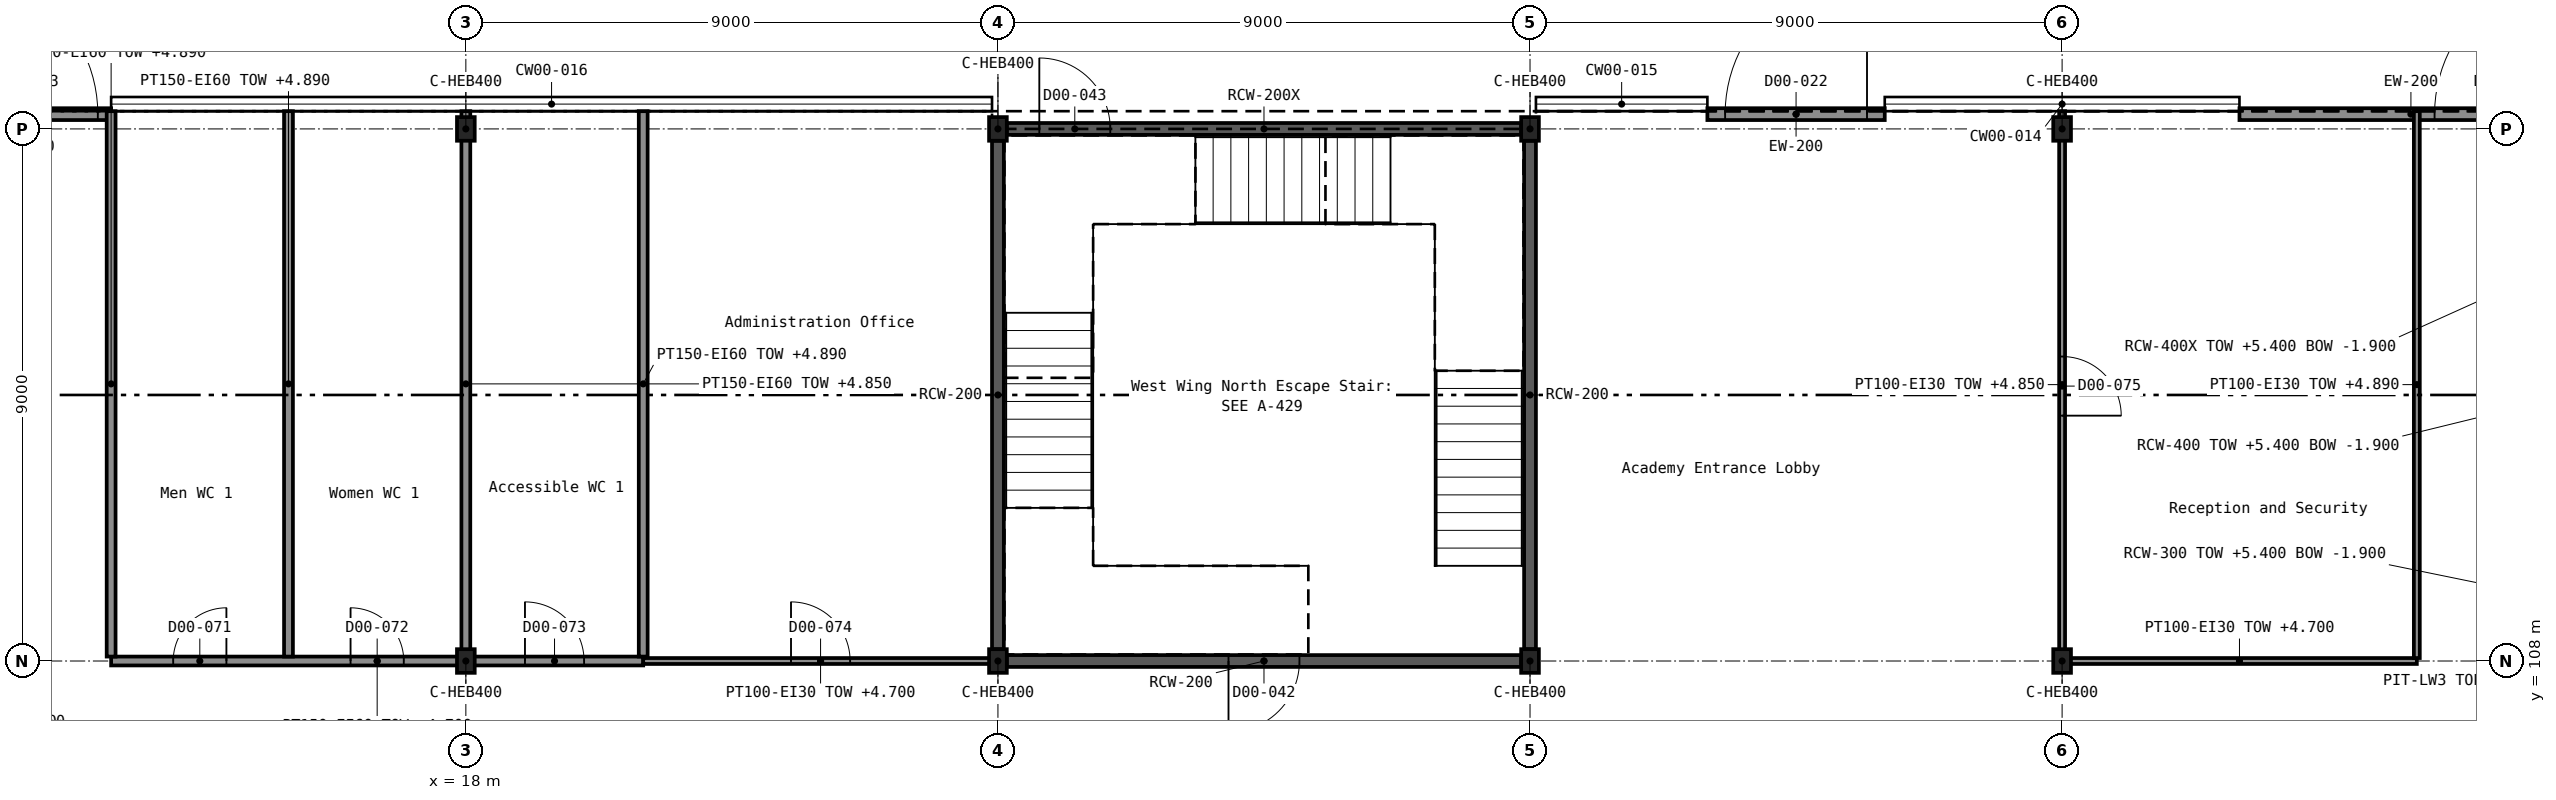
"""IFC4 building model, lengths in metres.
Left out: names, types, materials, properties, quantities, classifications, styles, units other than length and angle.
Written with IfcOpenShell. Run it as: python <this file> out.ifc"""

import sys

from ifc_helpers import new_model, si_unit, direction, frame, frame_2d, origin, origin_2d, place, context, subcontext, project, spatial, rectangle, i_section, extrude, element, fill, save


model = new_model("IFC4")
c1 = context("Model", 3, precision=1e-05, world=origin(), true_north=direction((0.0, 1.0)))
c2 = subcontext(c1, "Body", "Model", "MODEL_VIEW")
j1 = project(units=[si_unit("LENGTHUNIT", "METRE"), si_unit("PLANEANGLEUNIT", "RADIAN")], contexts=[c1])
p1 = place(None, origin())
s1 = spatial("IfcSite", under=j1, at=p1, CompositionType="ELEMENT")
p2 = place(p1, origin())
s2 = spatial("IfcBuilding", under=s1, at=p2, CompositionType="ELEMENT")
p3 = place(p2, origin())
s3 = spatial("IfcBuildingStorey", under=s2, at=p3, CompositionType="ELEMENT", Elevation=0.0)
for number, where, z_axis, x_axis in (
    (1, (18.0, 108.0, -0.3), (0.0, 0.0, 1.0), (1.0, 0.0, 0.0)),
    (2, (27.0, 108.0, -0.3), (0.0, 0.0, 1.0), (1.0, 0.0, 0.0)),
    (3, (36.0, 108.0, -0.3), (0.0, 0.0, 1.0), (1.0, 0.0, 0.0)),
    (4, (45.0, 108.0, -0.3), (0.0, 0.0, 1.0), (1.0, 0.0, 0.0)),
    (5, (18.0, 117.0, -0.3), (0.0, 0.0, 1.0), (1.0, 0.0, 0.0)),
    (6, (27.0, 117.0, -0.3), (0.0, 0.0, 1.0), (1.0, 0.0, 0.0)),
    (7, (36.0, 117.0, -0.3), (0.0, 0.0, 1.0), (1.0, 0.0, 0.0)),
    (8, (45.0, 117.0, -0.3), (0.0, 0.0, 1.0), (1.0, 0.0, 0.0)),
):
    element("IfcColumn", number, at=place(p3, frame(where, z_axis=z_axis, x_axis=x_axis)), inside=s3, PredefinedType="COLUMN", context=c2, shape_type="SweptSolid", body=[
        extrude(i_section(OverallWidth=0.3, OverallDepth=0.4, WebThickness=0.013, FlangeThickness=0.024, FilletRadius=0.027, at=origin_2d()), origin(), (0.0, 0.0, 1.0), 5.7),
    ])
p4 = place(p3, frame((53.8, 117.25, 0.0), z_axis=(0.0, 0.0, 1.0), x_axis=(-1.0, 0.0, 0.0)))
e9 = element("IfcWall", 9, at=p4, inside=s3, PredefinedType="SOLIDWALL", context=c2, shape_type="SweptSolid", body=[
    extrude(rectangle(XDim=5.8, YDim=0.2, at=frame_2d((2.9, 0.0))), origin(), (0.0, 0.0, 1.0), 5.4),
])
p5 = place(p4, frame((0.1, 0.0, 0.0)))
e10 = element("IfcOpeningElement", 10, at=p5, cuts=e9, PredefinedType="OPENING", context=c2, shape_type="SweptSolid", body=[
    extrude(rectangle(XDim=2.4, YDim=2.4, at=frame_2d((1.2, 1.2))), frame((0.0, 0.111, 0.0), z_axis=(0.0, -1.0, 0.0), x_axis=(1.0, 0.0, 0.0)), (0.0, 0.0, 1.0), 0.222),
])
p6 = place(p3, frame((42.0, 117.25, 0.0), z_axis=(0.0, 0.0, 1.0), x_axis=(-1.0, 0.0, 0.0)))
e11 = element("IfcWall", 11, at=p6, inside=s3, PredefinedType="SOLIDWALL", context=c2, shape_type="SweptSolid", body=[
    extrude(rectangle(XDim=3.0, YDim=0.2, at=frame_2d((1.5, 0.0))), origin(), (0.0, 0.0, 1.0), 5.4),
])
p7 = place(p6, frame((0.3, 0.0, 0.0)))
e12 = element("IfcOpeningElement", 12, at=p7, cuts=e11, PredefinedType="OPENING", context=c2, shape_type="SweptSolid", body=[
    extrude(rectangle(XDim=2.4, YDim=2.4, at=frame_2d((1.2, 1.2))), frame((0.0, 0.111, 0.0), z_axis=(0.0, -1.0, 0.0), x_axis=(1.0, 0.0, 0.0)), (0.0, 0.0, 1.0), 0.222),
])
p8 = place(p3, frame((12.0, 117.25, 0.0), z_axis=(0.0, 0.0, 1.0), x_axis=(-1.0, 0.0, 0.0)))
e13 = element("IfcWall", 13, at=p8, inside=s3, PredefinedType="SOLIDWALL", context=c2, shape_type="SweptSolid", body=[
    extrude(rectangle(XDim=2.85, YDim=0.2, at=frame_2d((1.425, 0.0))), origin(), (0.0, 0.0, 1.0), 5.4),
])
p9 = place(p8, frame((0.225, 0.0, 0.0)))
e14 = element("IfcOpeningElement", 14, at=p9, cuts=e13, PredefinedType="OPENING", context=c2, shape_type="SweptSolid", body=[
    extrude(rectangle(XDim=2.4, YDim=2.4, at=frame_2d((1.2, 1.2))), frame((0.0, 0.111, 0.0), z_axis=(0.0, -1.0, 0.0), x_axis=(1.0, 0.0, 0.0)), (0.0, 0.0, 1.0), 0.222),
])
p10 = place(p3, frame((27.15, 108.0, 0.0), z_axis=(0.0, 0.0, 1.0), x_axis=(1.0, 0.0, 0.0)))
e15 = element("IfcWall", 15, at=p10, inside=s3, PredefinedType="SHEAR", context=c2, shape_type="SweptSolid", body=[
    extrude(rectangle(XDim=8.7, YDim=0.2, at=frame_2d((4.35, 0.0))), origin(), (0.0, 0.0, 1.0), 5.4),
])
p11 = place(p10, frame((3.75, 0.0, 0.0)))
e16 = element("IfcOpeningElement", 16, at=p11, cuts=e15, PredefinedType="OPENING", context=c2, shape_type="SweptSolid", body=[
    extrude(rectangle(XDim=1.2, YDim=2.1, at=frame_2d((0.6, 1.05))), frame((0.0, 0.111, 0.0), z_axis=(0.0, -1.0, 0.0), x_axis=(1.0, 0.0, 0.0)), (0.0, 0.0, 1.0), 0.222),
])
p12 = place(p3, frame((27.15, 117.0, 0.0), z_axis=(0.0, 0.0, 1.0), x_axis=(1.0, 0.0, 0.0)))
e17 = element("IfcWall", 17, at=p12, inside=s3, PredefinedType="SHEAR", context=c2, shape_type="SweptSolid", body=[
    extrude(rectangle(XDim=8.7, YDim=0.2, at=frame_2d((4.35, 0.0))), origin(), (0.0, 0.0, 1.0), 5.4),
])
p13 = place(p12, frame((0.55, 0.0, 0.0)))
e18 = element("IfcOpeningElement", 18, at=p13, cuts=e17, PredefinedType="OPENING", context=c2, shape_type="SweptSolid", body=[
    extrude(rectangle(XDim=1.2, YDim=2.1, at=frame_2d((0.6, 1.05))), frame((0.0, 0.111, 0.0), z_axis=(0.0, -1.0, 0.0), x_axis=(1.0, 0.0, 0.0)), (0.0, 0.0, 1.0), 0.222),
])
for number, where, z_axis, x_axis in (
    (19, (27.0, 108.2, 0.0), (0.0, 0.0, 1.0), (0.0, 1.0, 0.0)),
    (20, (36.0, 108.2, 0.0), (0.0, 0.0, 1.0), (0.0, 1.0, 0.0)),
):
    element("IfcWall", number, at=place(p3, frame(where, z_axis=z_axis, x_axis=x_axis)), inside=s3, PredefinedType="SHEAR", context=c2, shape_type="SweptSolid", body=[
        extrude(rectangle(XDim=8.6, YDim=0.2, at=frame_2d((4.3, 0.0))), origin(), (0.0, 0.0, 1.0), 5.4),
    ])
p14 = place(p3, frame((12.0, 108.0, 0.0), z_axis=(0.0, 0.0, 1.0), x_axis=(1.0, 0.0, 0.0)))
e21 = element("IfcWall", 21, at=p14, inside=s3, PredefinedType="PARTITIONING", context=c2, shape_type="SweptSolid", body=[
    extrude(rectangle(XDim=9.0, YDim=0.15, at=frame_2d((4.5, 0.0))), origin(), (0.0, 0.0, 1.0), 4.7),
])
p15 = place(p14, frame((1.05, 0.0, 0.0)))
e22 = element("IfcOpeningElement", 22, at=p15, cuts=e21, PredefinedType="OPENING", context=c2, shape_type="SweptSolid", body=[
    extrude(rectangle(XDim=0.9, YDim=2.1, at=frame_2d((0.45, 1.05))), frame((0.0, 0.086, 0.0), z_axis=(0.0, -1.0, 0.0), x_axis=(1.0, 0.0, 0.0)), (0.0, 0.0, 1.0), 0.172),
])
p16 = place(p14, frame((4.05, 0.0, 0.0)))
e23 = element("IfcOpeningElement", 23, at=p16, cuts=e21, PredefinedType="OPENING", context=c2, shape_type="SweptSolid", body=[
    extrude(rectangle(XDim=0.9, YDim=2.1, at=frame_2d((0.45, 1.05))), frame((0.0, 0.086, 0.0), z_axis=(0.0, -1.0, 0.0), x_axis=(1.0, 0.0, 0.0)), (0.0, 0.0, 1.0), 0.172),
])
p17 = place(p14, frame((7.0, 0.0, 0.0)))
e24 = element("IfcOpeningElement", 24, at=p17, cuts=e21, PredefinedType="OPENING", context=c2, shape_type="SweptSolid", body=[
    extrude(rectangle(XDim=1.0, YDim=2.1, at=frame_2d((0.5, 1.05))), frame((0.0, 0.086, 0.0), z_axis=(0.0, -1.0, 0.0), x_axis=(1.0, 0.0, 0.0)), (0.0, 0.0, 1.0), 0.172),
])
for number, where, z_axis, x_axis in (
    (25, (12.0, 108.075, 0.0), (0.0, 0.0, 1.0), (0.0, 1.0, 0.0)),
    (26, (15.0, 108.075, 0.0), (0.0, 0.0, 1.0), (0.0, 1.0, 0.0)),
):
    element("IfcWall", number, at=place(p3, frame(where, z_axis=z_axis, x_axis=x_axis)), inside=s3, PredefinedType="PARTITIONING", context=c2, shape_type="SweptSolid", body=[
        extrude(rectangle(XDim=9.225, YDim=0.15, at=frame_2d((4.613, 0.0))), origin(), (0.0, 0.0, 1.0), 4.89),
    ])
p18 = place(p3, frame((18.0, 108.075, 0.0), z_axis=(0.0, 0.0, 1.0), x_axis=(0.0, 1.0, 0.0)))
e27 = element("IfcWall", 27, at=p18, inside=s3, PredefinedType="PARTITIONING", context=c2, shape_type="SweptSolid", body=[
    extrude(rectangle(XDim=9.225, YDim=0.15, at=frame_2d((4.613, 0.0))), origin(), (0.0, 0.0, 1.0), 4.85),
])
p19 = place(p3, frame((21.0, 108.075, 0.0), z_axis=(0.0, 0.0, 1.0), x_axis=(0.0, 1.0, 0.0)))
e28 = element("IfcWall", 28, at=p19, inside=s3, PredefinedType="PARTITIONING", context=c2, shape_type="SweptSolid", body=[
    extrude(rectangle(XDim=9.225, YDim=0.15, at=frame_2d((4.613, 0.0))), origin(), (0.0, 0.0, 1.0), 4.89),
])
p20 = place(p3, frame((21.0, 108.0, 0.0), z_axis=(0.0, 0.0, 1.0), x_axis=(1.0, 0.0, 0.0)))
e29 = element("IfcWall", 29, at=p20, inside=s3, PredefinedType="PARTITIONING", context=c2, shape_type="SweptSolid", body=[
    extrude(rectangle(XDim=6.0, YDim=0.1, at=frame_2d((3.0, 0.0))), origin(), (0.0, 0.0, 1.0), 4.7),
])
p21 = place(p20, frame((2.5, 0.0, 0.0)))
e30 = element("IfcOpeningElement", 30, at=p21, cuts=e29, PredefinedType="OPENING", context=c2, shape_type="SweptSolid", body=[
    extrude(rectangle(XDim=1.0, YDim=2.1, at=frame_2d((0.5, 1.05))), frame((0.0, 0.061, 0.0), z_axis=(0.0, -1.0, 0.0), x_axis=(1.0, 0.0, 0.0)), (0.0, 0.0, 1.0), 0.122),
])
p22 = place(p3, frame((45.0, 108.0, 0.0), z_axis=(0.0, 0.0, 1.0), x_axis=(1.0, 0.0, 0.0)))
e31 = element("IfcWall", 31, at=p22, inside=s3, PredefinedType="PARTITIONING", context=c2, shape_type="SweptSolid", body=[
    extrude(rectangle(XDim=6.0, YDim=0.1, at=frame_2d((3.0, 0.0))), origin(), (0.0, 0.0, 1.0), 4.7),
])
p23 = place(p3, frame((45.0, 108.05, 0.0), z_axis=(0.0, 0.0, 1.0), x_axis=(0.0, 1.0, 0.0)))
e32 = element("IfcWall", 32, at=p23, inside=s3, PredefinedType="PARTITIONING", context=c2, shape_type="SweptSolid", body=[
    extrude(rectangle(XDim=9.25, YDim=0.1, at=frame_2d((4.625, 0.0))), origin(), (0.0, 0.0, 1.0), 4.85),
])
p24 = place(p23, frame((4.1, 0.0, 0.0)))
e33 = element("IfcOpeningElement", 33, at=p24, cuts=e32, PredefinedType="OPENING", context=c2, shape_type="SweptSolid", body=[
    extrude(rectangle(XDim=1.0, YDim=2.4, at=frame_2d((0.5, 1.2))), frame((0.0, 0.061, 0.0), z_axis=(0.0, -1.0, 0.0), x_axis=(1.0, 0.0, 0.0)), (0.0, 0.0, 1.0), 0.122),
])
p25 = place(p3, frame((51.0, 108.05, 0.0), z_axis=(0.0, 0.0, 1.0), x_axis=(0.0, 1.0, 0.0)))
e34 = element("IfcWall", 34, at=p25, inside=s3, PredefinedType="PARTITIONING", context=c2, shape_type="SweptSolid", body=[
    extrude(rectangle(XDim=9.25, YDim=0.1, at=frame_2d((4.625, 0.0))), origin(), (0.0, 0.0, 1.0), 4.89),
])
p26 = place(p5, frame((2.4, 0.0, 0.0), z_axis=(0.0, 0.0, 1.0), x_axis=(-1.0, 0.0, 0.0)))
e35 = element("IfcDoor", 35, at=p26, inside=s3, OperationType="DOUBLE_DOOR_DOUBLE_SWING", PredefinedType="DOOR", context=c2, shape_type="SweptSolid", body=[
    extrude(rectangle(XDim=2.4, YDim=2.4, at=frame_2d((1.2, 1.2))), frame((0.0, 0.025, 0.0), z_axis=(0.0, -1.0, 0.0), x_axis=(1.0, 0.0, 0.0)), (0.0, 0.0, 1.0), 0.05),
])
fill(e10, e35)
p27 = place(p7, frame((2.4, 0.0, 0.0), z_axis=(0.0, 0.0, 1.0), x_axis=(-1.0, 0.0, 0.0)))
e36 = element("IfcDoor", 36, at=p27, inside=s3, OperationType="DOUBLE_DOOR_DOUBLE_SWING", PredefinedType="DOOR", context=c2, shape_type="SweptSolid", body=[
    extrude(rectangle(XDim=2.4, YDim=2.4, at=frame_2d((1.2, 1.2))), frame((0.0, 0.025, 0.0), z_axis=(0.0, -1.0, 0.0), x_axis=(1.0, 0.0, 0.0)), (0.0, 0.0, 1.0), 0.05),
])
fill(e12, e36)
p28 = place(p9, frame((2.4, 0.0, 0.0), z_axis=(0.0, 0.0, 1.0), x_axis=(-1.0, 0.0, 0.0)))
e37 = element("IfcDoor", 37, at=p28, inside=s3, OperationType="DOUBLE_DOOR_DOUBLE_SWING", PredefinedType="DOOR", context=c2, shape_type="SweptSolid", body=[
    extrude(rectangle(XDim=2.4, YDim=2.4, at=frame_2d((1.2, 1.2))), frame((0.0, 0.025, 0.0), z_axis=(0.0, -1.0, 0.0), x_axis=(1.0, 0.0, 0.0)), (0.0, 0.0, 1.0), 0.05),
])
fill(e14, e37)
p29 = place(p11, frame((1.2, 0.0, 0.0), z_axis=(0.0, 0.0, 1.0), x_axis=(-1.0, 0.0, 0.0)))
e38 = element("IfcDoor", 38, at=p29, inside=s3, OperationType="SINGLE_SWING_RIGHT", PredefinedType="DOOR", context=c2, shape_type="SweptSolid", body=[
    extrude(rectangle(XDim=1.2, YDim=2.1, at=frame_2d((0.6, 1.05))), frame((0.0, 0.025, 0.0), z_axis=(0.0, -1.0, 0.0), x_axis=(1.0, 0.0, 0.0)), (0.0, 0.0, 1.0), 0.05),
])
fill(e16, e38)
p30 = place(p13, origin())
e39 = element("IfcDoor", 39, at=p30, inside=s3, OperationType="SINGLE_SWING_LEFT", PredefinedType="DOOR", context=c2, shape_type="SweptSolid", body=[
    extrude(rectangle(XDim=1.2, YDim=2.1, at=frame_2d((0.6, 1.05))), frame((0.0, 0.025, 0.0), z_axis=(0.0, -1.0, 0.0), x_axis=(1.0, 0.0, 0.0)), (0.0, 0.0, 1.0), 0.05),
])
fill(e18, e39)
p31 = place(p15, origin())
e40 = element("IfcDoor", 40, at=p31, inside=s3, OperationType="SINGLE_SWING_RIGHT", PredefinedType="DOOR", context=c2, shape_type="SweptSolid", body=[
    extrude(rectangle(XDim=0.9, YDim=2.1, at=frame_2d((0.45, 1.05))), frame((0.0, 0.025, 0.0), z_axis=(0.0, -1.0, 0.0), x_axis=(1.0, 0.0, 0.0)), (0.0, 0.0, 1.0), 0.05),
])
fill(e22, e40)
p32 = place(p16, origin())
e41 = element("IfcDoor", 41, at=p32, inside=s3, OperationType="SINGLE_SWING_LEFT", PredefinedType="DOOR", context=c2, shape_type="SweptSolid", body=[
    extrude(rectangle(XDim=0.9, YDim=2.1, at=frame_2d((0.45, 1.05))), frame((0.0, 0.025, 0.0), z_axis=(0.0, -1.0, 0.0), x_axis=(1.0, 0.0, 0.0)), (0.0, 0.0, 1.0), 0.05),
])
fill(e23, e41)
p33 = place(p17, origin())
e42 = element("IfcDoor", 42, at=p33, inside=s3, OperationType="SINGLE_SWING_LEFT", PredefinedType="DOOR", context=c2, shape_type="SweptSolid", body=[
    extrude(rectangle(XDim=1.0, YDim=2.1, at=frame_2d((0.5, 1.05))), frame((0.0, 0.025, 0.0), z_axis=(0.0, -1.0, 0.0), x_axis=(1.0, 0.0, 0.0)), (0.0, 0.0, 1.0), 0.05),
])
fill(e24, e42)
p34 = place(p21, origin())
e43 = element("IfcDoor", 43, at=p34, inside=s3, OperationType="SINGLE_SWING_LEFT", PredefinedType="DOOR", context=c2, shape_type="SweptSolid", body=[
    extrude(rectangle(XDim=1.0, YDim=2.1, at=frame_2d((0.5, 1.05))), frame((0.0, 0.025, 0.0), z_axis=(0.0, -1.0, 0.0), x_axis=(1.0, 0.0, 0.0)), (0.0, 0.0, 1.0), 0.05),
])
fill(e30, e43)
p35 = place(p24, frame((1.0, 0.0, 0.0), z_axis=(0.0, 0.0, 1.0), x_axis=(-1.0, 0.0, 0.0)))
e44 = element("IfcDoor", 44, at=p35, inside=s3, OperationType="SINGLE_SWING_RIGHT", PredefinedType="DOOR", context=c2, shape_type="SweptSolid", body=[
    extrude(rectangle(XDim=1.0, YDim=2.4, at=frame_2d((0.5, 1.2))), frame((0.0, 0.025, 0.0), z_axis=(0.0, -1.0, 0.0), x_axis=(1.0, 0.0, 0.0)), (0.0, 0.0, 1.0), 0.05),
])
fill(e33, e44)
save(model, sys.argv[1])
